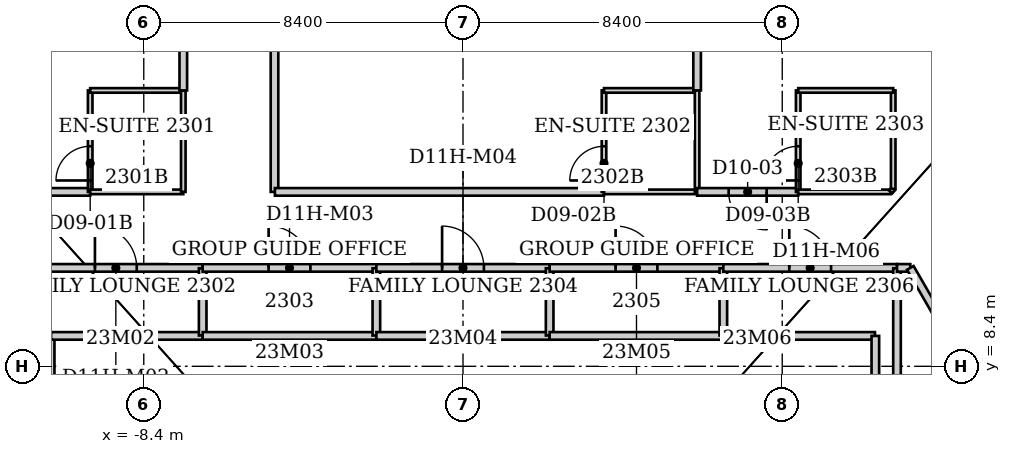
"""IFC4 building model, lengths in metres.
Left out: names, types, materials, properties, quantities, classifications, styles, units other than length and angle.
Written with IfcOpenShell. Run it as: python <this file> out.ifc"""

import sys

from ifc_helpers import new_model, si_unit, direction, frame, frame_2d, origin, place, context, subcontext, project, spatial, rectangle, extrude, element, fill, save


model = new_model("IFC4")
c1 = context("Model", 3, precision=1e-05, world=origin(), true_north=direction((0.0, 1.0)))
c2 = subcontext(c1, "Body", "Model", "MODEL_VIEW")
j1 = project(units=[si_unit("LENGTHUNIT", "METRE"), si_unit("PLANEANGLEUNIT", "RADIAN")], contexts=[c1])
p1 = place(None, origin())
s1 = spatial("IfcSite", under=j1, at=p1, CompositionType="ELEMENT")
p2 = place(p1, origin())
s2 = spatial("IfcBuilding", under=s1, at=p2, CompositionType="ELEMENT")
p3 = place(p2, frame((0.0, 0.0, 96.8)))
s3 = spatial("IfcBuildingStorey", under=s2, at=p3, CompositionType="ELEMENT", Elevation=96.8)
p4 = place(p3, frame((-11.42, 10.99, 0.0), z_axis=(0.0, 0.0, 1.0), x_axis=(1.0, 0.0, 0.0)))
e1 = element("IfcWall", 1, at=p4, inside=s3, PredefinedType="PARTITIONING", context=c2, shape_type="SweptSolid", body=[
    extrude(rectangle(XDim=4.57, YDim=0.2, at=frame_2d((2.285, 0.0))), origin(), (0.0, 0.0, 1.0), 3.64),
])
p5 = place(p4, frame((1.735, 0.0, 0.0)))
e2 = element("IfcOpeningElement", 2, at=p5, cuts=e1, PredefinedType="OPENING", context=c2, shape_type="SweptSolid", body=[
    extrude(rectangle(XDim=1.1, YDim=2.2, at=frame_2d((0.55, 1.1))), frame((0.0, 0.1, 0.0), z_axis=(0.0, -1.0, 0.0), x_axis=(1.0, 0.0, 0.0)), (0.0, 0.0, 1.0), 0.2),
])
p6 = place(p3, frame((-10.85, 9.2, 0.0), z_axis=(0.0, 0.0, 1.0), x_axis=(0.0, -1.0, 0.0)))
e3 = element("IfcWall", 3, at=p6, inside=s3, PredefinedType="PARTITIONING", context=c2, shape_type="SweptSolid", body=[
    extrude(rectangle(XDim=14.39, YDim=0.2, at=frame_2d((7.195, 0.0))), origin(), (0.0, 0.0, 1.0), 3.64),
])
p7 = place(p3, frame((-9.81, 12.99, 0.0), z_axis=(0.0, 0.0, 1.0), x_axis=(-1.0, 0.0, 0.0)))
e4 = element("IfcWall", 4, at=p7, inside=s3, PredefinedType="PARTITIONING", context=c2, shape_type="SweptSolid", body=[
    extrude(rectangle(XDim=1.44, YDim=0.2, at=frame_2d((0.72, 0.0))), origin(), (0.0, 0.0, 1.0), 3.64),
])
p8 = place(p3, frame((-9.81, 15.66, 0.0), z_axis=(0.0, 0.0, 1.0), x_axis=(0.0, -1.0, 0.0)))
e5 = element("IfcWall", 5, at=p8, inside=s3, PredefinedType="PARTITIONING", context=c2, shape_type="SweptSolid", body=[
    extrude(rectangle(XDim=2.67, YDim=0.12, at=frame_2d((1.335, 0.0))), origin(), (0.0, 0.0, 1.0), 3.038),
])
p9 = place(p8, frame((1.47, 0.0, 0.0)))
e6 = element("IfcOpeningElement", 6, at=p9, cuts=e5, PredefinedType="OPENING", context=c2, shape_type="SweptSolid", body=[
    extrude(rectangle(XDim=0.9, YDim=2.03, at=frame_2d((0.45, 1.015))), frame((0.0, 0.06, 0.0), z_axis=(0.0, -1.0, 0.0), x_axis=(1.0, 0.0, 0.0)), (0.0, 0.0, 1.0), 0.12),
])
for number, where, z_axis, x_axis in (
    (7, (-7.36, 12.99, 0.0), (0.0, 0.0, 1.0), (-1.0, 0.0, 0.0)),
    (8, (-7.36, 15.66, 0.0), (0.0, 0.0, 1.0), (-1.0, 0.0, 0.0)),
):
    element("IfcWall", number, at=place(p3, frame(where, z_axis=z_axis, x_axis=x_axis)), inside=s3, PredefinedType="PARTITIONING", context=c2, shape_type="SweptSolid", body=[
        extrude(rectangle(XDim=2.45, YDim=0.12, at=frame_2d((1.225, 0.0))), origin(), (0.0, 0.0, 1.0), 3.64),
    ])
p10 = place(p3, frame((-7.36, 15.66, 0.0), z_axis=(0.0, 0.0, 1.0), x_axis=(0.0, -1.0, 0.0)))
e9 = element("IfcWall", 9, at=p10, inside=s3, PredefinedType="PARTITIONING", context=c2, shape_type="SweptSolid", body=[
    extrude(rectangle(XDim=2.67, YDim=0.12, at=frame_2d((1.335, 0.0))), origin(), (0.0, 0.0, 1.0), 3.64),
])
p11 = place(p3, frame((-7.36, 22.46, 0.0), z_axis=(0.0, 0.0, 1.0), x_axis=(0.0, -1.0, 0.0)))
e10 = element("IfcWall", 10, at=p11, inside=s3, PredefinedType="PARTITIONING", context=c2, shape_type="SweptSolid", body=[
    extrude(rectangle(XDim=6.8, YDim=0.2, at=frame_2d((3.4, 0.0))), origin(), (0.0, 0.0, 1.0), 3.64),
])
p12 = place(p11, frame((2.9, 0.0, 0.0)))
e11 = element("IfcOpeningElement", 11, at=p12, cuts=e10, PredefinedType="OPENING", context=c2, shape_type="SweptSolid", body=[
    extrude(rectangle(XDim=1.0, YDim=2.13, at=frame_2d((0.5, 1.065))), frame((0.0, 0.1, 0.0), z_axis=(0.0, -1.0, 0.0), x_axis=(1.0, 0.0, 0.0)), (0.0, 0.0, 1.0), 0.2),
])
p13 = place(p3, frame((-6.85, 9.2, 0.0), z_axis=(0.0, 0.0, 1.0), x_axis=(-1.0, 0.0, 0.0)))
e12 = element("IfcWall", 12, at=p13, inside=s3, PredefinedType="PARTITIONING", context=c2, shape_type="SweptSolid", body=[
    extrude(rectangle(XDim=3.99, YDim=0.2, at=frame_2d((1.995, 0.0))), origin(), (0.0, 0.0, 1.0), 3.64),
])
p14 = place(p3, frame((-6.85, 10.98, 0.0), z_axis=(0.0, 0.0, 1.0), x_axis=(0.0, -1.0, 0.0)))
e13 = element("IfcWall", 13, at=p14, inside=s3, PredefinedType="PARTITIONING", context=c2, shape_type="SweptSolid", body=[
    extrude(rectangle(XDim=1.77, YDim=0.2, at=frame_2d((0.885, 0.0))), origin(), (0.0, 0.0, 1.0), 3.64),
])
p15 = place(p3, frame((-6.85, 10.99, 0.0), z_axis=(0.0, 0.0, 1.0), x_axis=(1.0, 0.0, 0.0)))
e14 = element("IfcWall", 14, at=p15, inside=s3, PredefinedType="PARTITIONING", context=c2, shape_type="SweptSolid", body=[
    extrude(rectangle(XDim=4.57, YDim=0.2, at=frame_2d((2.285, 0.0))), origin(), (0.0, 0.0, 1.0), 3.64),
])
p16 = place(p15, frame((1.735, 0.0, 0.0)))
e15 = element("IfcOpeningElement", 15, at=p16, cuts=e14, PredefinedType="OPENING", context=c2, shape_type="SweptSolid", body=[
    extrude(rectangle(XDim=1.1, YDim=2.2, at=frame_2d((0.55, 1.1))), frame((0.0, 0.1, 0.0), z_axis=(0.0, -1.0, 0.0), x_axis=(1.0, 0.0, 0.0)), (0.0, 0.0, 1.0), 0.2),
])
p17 = place(p3, frame((-4.96, 12.99, 0.0), z_axis=(0.0, 0.0, 1.0), x_axis=(0.0, 1.0, 0.0)))
e16 = element("IfcWall", 16, at=p17, inside=s3, PredefinedType="PARTITIONING", context=c2, shape_type="SweptSolid", body=[
    extrude(rectangle(XDim=9.47, YDim=0.2, at=frame_2d((4.735, 0.0))), origin(), (0.0, 0.0, 1.0), 3.64),
])
p18 = place(p17, frame((4.235, 0.0, 0.0)))
e17 = element("IfcOpeningElement", 17, at=p18, cuts=e16, PredefinedType="OPENING", context=c2, shape_type="SweptSolid", body=[
    extrude(rectangle(XDim=1.0, YDim=2.13, at=frame_2d((0.5, 1.065))), frame((0.0, 0.1, 0.0), z_axis=(0.0, -1.0, 0.0), x_axis=(1.0, 0.0, 0.0)), (0.0, 0.0, 1.0), 0.2),
])
p19 = place(p3, frame((-2.28, 9.2, 0.0), z_axis=(0.0, 0.0, 1.0), x_axis=(-1.0, 0.0, 0.0)))
e18 = element("IfcWall", 18, at=p19, inside=s3, PredefinedType="PARTITIONING", context=c2, shape_type="SweptSolid", body=[
    extrude(rectangle(XDim=4.57, YDim=0.2, at=frame_2d((2.285, 0.0))), origin(), (0.0, 0.0, 1.0), 3.64),
])
p20 = place(p3, frame((-2.28, 10.98, 0.0), z_axis=(0.0, 0.0, 1.0), x_axis=(0.0, -1.0, 0.0)))
e19 = element("IfcWall", 19, at=p20, inside=s3, PredefinedType="PARTITIONING", context=c2, shape_type="SweptSolid", body=[
    extrude(rectangle(XDim=1.77, YDim=0.2, at=frame_2d((0.885, 0.0))), origin(), (0.0, 0.0, 1.0), 3.64),
])
p21 = place(p3, frame((-2.28, 10.99, 0.0), z_axis=(0.0, 0.0, 1.0), x_axis=(1.0, 0.0, 0.0)))
e20 = element("IfcWall", 20, at=p21, inside=s3, PredefinedType="PARTITIONING", context=c2, shape_type="SweptSolid", body=[
    extrude(rectangle(XDim=4.56, YDim=0.2, at=frame_2d((2.28, 0.0))), origin(), (0.0, 0.0, 1.0), 3.64),
])
p22 = place(p21, frame((1.73, 0.0, 0.0)))
e21 = element("IfcOpeningElement", 21, at=p22, cuts=e20, PredefinedType="OPENING", context=c2, shape_type="SweptSolid", body=[
    extrude(rectangle(XDim=1.1, YDim=2.2, at=frame_2d((0.55, 1.1))), frame((0.0, 0.1, 0.0), z_axis=(0.0, -1.0, 0.0), x_axis=(1.0, 0.0, 0.0)), (0.0, 0.0, 1.0), 0.2),
])
p23 = place(p3, frame((2.28, 9.2, 0.0), z_axis=(0.0, 0.0, 1.0), x_axis=(-1.0, 0.0, 0.0)))
e22 = element("IfcWall", 22, at=p23, inside=s3, PredefinedType="PARTITIONING", context=c2, shape_type="SweptSolid", body=[
    extrude(rectangle(XDim=4.56, YDim=0.2, at=frame_2d((2.28, 0.0))), origin(), (0.0, 0.0, 1.0), 3.64),
])
p24 = place(p3, frame((2.28, 10.98, 0.0), z_axis=(0.0, 0.0, 1.0), x_axis=(0.0, -1.0, 0.0)))
e23 = element("IfcWall", 23, at=p24, inside=s3, PredefinedType="PARTITIONING", context=c2, shape_type="SweptSolid", body=[
    extrude(rectangle(XDim=1.77, YDim=0.2, at=frame_2d((0.885, 0.0))), origin(), (0.0, 0.0, 1.0), 3.64),
])
p25 = place(p3, frame((2.28, 10.99, 0.0), z_axis=(0.0, 0.0, 1.0), x_axis=(1.0, 0.0, 0.0)))
e24 = element("IfcWall", 24, at=p25, inside=s3, PredefinedType="PARTITIONING", context=c2, shape_type="SweptSolid", body=[
    extrude(rectangle(XDim=4.57, YDim=0.2, at=frame_2d((2.285, 0.0))), origin(), (0.0, 0.0, 1.0), 3.64),
])
p26 = place(p25, frame((1.735, 0.0, 0.0)))
e25 = element("IfcOpeningElement", 25, at=p26, cuts=e24, PredefinedType="OPENING", context=c2, shape_type="SweptSolid", body=[
    extrude(rectangle(XDim=1.1, YDim=2.2, at=frame_2d((0.55, 1.1))), frame((0.0, 0.1, 0.0), z_axis=(0.0, -1.0, 0.0), x_axis=(1.0, 0.0, 0.0)), (0.0, 0.0, 1.0), 0.2),
])
p27 = place(p3, frame((3.71, 12.99, 0.0), z_axis=(0.0, 0.0, 1.0), x_axis=(-1.0, 0.0, 0.0)))
e26 = element("IfcWall", 26, at=p27, inside=s3, PredefinedType="PARTITIONING", context=c2, shape_type="SweptSolid", body=[
    extrude(rectangle(XDim=8.66, YDim=0.2, at=frame_2d((4.33, 0.0))), origin(), (0.0, 0.0, 1.0), 3.64),
])
p28 = place(p3, frame((3.71, 15.66, 0.0), z_axis=(0.0, 0.0, 1.0), x_axis=(0.0, -1.0, 0.0)))
e27 = element("IfcWall", 27, at=p28, inside=s3, PredefinedType="PARTITIONING", context=c2, shape_type="SweptSolid", body=[
    extrude(rectangle(XDim=2.67, YDim=0.12, at=frame_2d((1.335, 0.0))), origin(), (0.0, 0.0, 1.0), 3.64),
])
p29 = place(p28, frame((1.47, 0.0, 0.0)))
e28 = element("IfcOpeningElement", 28, at=p29, cuts=e27, PredefinedType="OPENING", context=c2, shape_type="SweptSolid", body=[
    extrude(rectangle(XDim=0.9, YDim=2.03, at=frame_2d((0.45, 1.015))), frame((0.0, 0.06, 0.0), z_axis=(0.0, -1.0, 0.0), x_axis=(1.0, 0.0, 0.0)), (0.0, 0.0, 1.0), 0.12),
])
for number, where, z_axis, x_axis in (
    (29, (6.16, 12.99, 0.0), (0.0, 0.0, 1.0), (-1.0, 0.0, 0.0)),
    (30, (6.16, 15.66, 0.0), (0.0, 0.0, 1.0), (-1.0, 0.0, 0.0)),
):
    element("IfcWall", number, at=place(p3, frame(where, z_axis=z_axis, x_axis=x_axis)), inside=s3, PredefinedType="PARTITIONING", context=c2, shape_type="SweptSolid", body=[
        extrude(rectangle(XDim=2.45, YDim=0.12, at=frame_2d((1.225, 0.0))), origin(), (0.0, 0.0, 1.0), 3.64),
    ])
p30 = place(p3, frame((6.16, 15.66, 0.0), z_axis=(0.0, 0.0, 1.0), x_axis=(0.0, -1.0, 0.0)))
e31 = element("IfcWall", 31, at=p30, inside=s3, PredefinedType="PARTITIONING", context=c2, shape_type="SweptSolid", body=[
    extrude(rectangle(XDim=2.67, YDim=0.12, at=frame_2d((1.335, 0.0))), origin(), (0.0, 0.0, 1.0), 3.64),
])
p31 = place(p3, frame((6.16, 22.37, 0.0), z_axis=(0.0, 0.0, 1.0), x_axis=(0.0, -1.0, 0.0)))
e32 = element("IfcWall", 32, at=p31, inside=s3, PredefinedType="PARTITIONING", context=c2, shape_type="SweptSolid", body=[
    extrude(rectangle(XDim=6.71, YDim=0.2, at=frame_2d((3.355, 0.0))), origin(), (0.0, 0.0, 1.0), 3.64),
])
p32 = place(p3, frame((6.85, 9.2, 0.0), z_axis=(0.0, 0.0, 1.0), x_axis=(-1.0, 0.0, 0.0)))
e33 = element("IfcWall", 33, at=p32, inside=s3, PredefinedType="PARTITIONING", context=c2, shape_type="SweptSolid", body=[
    extrude(rectangle(XDim=4.57, YDim=0.2, at=frame_2d((2.285, 0.0))), origin(), (0.0, 0.0, 1.0), 3.64),
])
p33 = place(p3, frame((6.85, 10.98, 0.0), z_axis=(0.0, 0.0, 1.0), x_axis=(0.0, -1.0, 0.0)))
e34 = element("IfcWall", 34, at=p33, inside=s3, PredefinedType="PARTITIONING", context=c2, shape_type="SweptSolid", body=[
    extrude(rectangle(XDim=1.77, YDim=0.2, at=frame_2d((0.885, 0.0))), origin(), (0.0, 0.0, 1.0), 3.64),
])
p34 = place(p3, frame((6.85, 10.99, 0.0), z_axis=(0.0, 0.0, 1.0), x_axis=(1.0, 0.0, 0.0)))
e35 = element("IfcWall", 35, at=p34, inside=s3, PredefinedType="PARTITIONING", context=c2, shape_type="SweptSolid", body=[
    extrude(rectangle(XDim=4.57, YDim=0.2, at=frame_2d((2.285, 0.0))), origin(), (0.0, 0.0, 1.0), 3.64),
])
p35 = place(p34, frame((1.735, 0.0, 0.0)))
e36 = element("IfcOpeningElement", 36, at=p35, cuts=e35, PredefinedType="OPENING", context=c2, shape_type="SweptSolid", body=[
    extrude(rectangle(XDim=1.1, YDim=2.2, at=frame_2d((0.55, 1.1))), frame((0.0, 0.1, 0.0), z_axis=(0.0, -1.0, 0.0), x_axis=(1.0, 0.0, 0.0)), (0.0, 0.0, 1.0), 0.2),
])
p36 = place(p3, frame((8.82, 12.99, 0.0), z_axis=(0.0, 0.0, 1.0), x_axis=(-1.0, 0.0, 0.0)))
e37 = element("IfcWall", 37, at=p36, inside=s3, PredefinedType="PARTITIONING", context=c2, shape_type="SweptSolid", body=[
    extrude(rectangle(XDim=2.66, YDim=0.2, at=frame_2d((1.33, 0.0))), origin(), (0.0, 0.0, 1.0), 3.64),
])
p37 = place(p36, frame((0.83, 0.0, 0.0)))
e38 = element("IfcOpeningElement", 38, at=p37, cuts=e37, PredefinedType="OPENING", context=c2, shape_type="SweptSolid", body=[
    extrude(rectangle(XDim=1.0, YDim=2.13, at=frame_2d((0.5, 1.065))), frame((0.0, 0.1, 0.0), z_axis=(0.0, -1.0, 0.0), x_axis=(1.0, 0.0, 0.0)), (0.0, 0.0, 1.0), 0.2),
])
p38 = place(p3, frame((8.82, 15.66, 0.0), z_axis=(0.0, 0.0, 1.0), x_axis=(0.0, -1.0, 0.0)))
e39 = element("IfcWall", 39, at=p38, inside=s3, PredefinedType="PARTITIONING", context=c2, shape_type="SweptSolid", body=[
    extrude(rectangle(XDim=2.67, YDim=0.12, at=frame_2d((1.335, 0.0))), origin(), (0.0, 0.0, 1.0), 3.64),
])
p39 = place(p38, frame((1.47, 0.0, 0.0)))
e40 = element("IfcOpeningElement", 40, at=p39, cuts=e39, PredefinedType="OPENING", context=c2, shape_type="SweptSolid", body=[
    extrude(rectangle(XDim=0.9, YDim=2.03, at=frame_2d((0.45, 1.015))), frame((0.0, 0.06, 0.0), z_axis=(0.0, -1.0, 0.0), x_axis=(1.0, 0.0, 0.0)), (0.0, 0.0, 1.0), 0.12),
])
p40 = place(p3, frame((10.84, 9.2, 0.0), z_axis=(0.0, 0.0, 1.0), x_axis=(-1.0, 0.0, 0.0)))
e41 = element("IfcWall", 41, at=p40, inside=s3, PredefinedType="PARTITIONING", context=c2, shape_type="SweptSolid", body=[
    extrude(rectangle(XDim=3.99, YDim=0.2, at=frame_2d((1.995, 0.0))), origin(), (0.0, 0.0, 1.0), 3.64),
])
p41 = place(p3, frame((10.85, -5.19, 0.0), z_axis=(0.0, 0.0, 1.0), x_axis=(0.0, 1.0, 0.0)))
e42 = element("IfcWall", 42, at=p41, inside=s3, PredefinedType="PARTITIONING", context=c2, shape_type="SweptSolid", body=[
    extrude(rectangle(XDim=14.39, YDim=0.2, at=frame_2d((7.195, 0.0))), origin(), (0.0, 0.0, 1.0), 3.64),
])
p42 = place(p3, frame((11.25, 12.99, 0.0), z_axis=(0.0, 0.0, 1.0), x_axis=(-1.0, 0.0, 0.0)))
e43 = element("IfcWall", 43, at=p42, inside=s3, PredefinedType="PARTITIONING", context=c2, shape_type="SweptSolid", body=[
    extrude(rectangle(XDim=2.43, YDim=0.12, at=frame_2d((1.215, 0.0))), origin(), (0.0, 0.0, 1.0), 3.64),
])
p43 = place(p3, frame((11.32, 13.07, 0.0), z_axis=(0.0, 0.0, 1.0), x_axis=(-0.658504607869, -0.752576694707, 0.0)))
e44 = element("IfcWall", 44, at=p43, inside=s3, PredefinedType="PARTITIONING", context=c2, shape_type="SweptSolid", body=[
    extrude(rectangle(XDim=0.106, YDim=0.12, at=frame_2d((0.053, 0.0))), origin(), (0.0, 0.0, 1.0), 3.64),
])
p44 = place(p3, frame((11.32, 13.07, 0.0), z_axis=(0.0, 0.0, 1.0), x_axis=(0.0, 1.0, 0.0)))
e45 = element("IfcWall", 45, at=p44, inside=s3, PredefinedType="PARTITIONING", context=c2, shape_type="SweptSolid", body=[
    extrude(rectangle(XDim=2.59, YDim=0.12, at=frame_2d((1.295, 0.0))), origin(), (0.0, 0.0, 1.0), 3.64),
])
p45 = place(p3, frame((11.32, 15.66, 0.0), z_axis=(0.0, 0.0, 1.0), x_axis=(-1.0, 0.0, 0.0)))
e46 = element("IfcWall", 46, at=p45, inside=s3, PredefinedType="PARTITIONING", context=c2, shape_type="SweptSolid", body=[
    extrude(rectangle(XDim=2.5, YDim=0.12, at=frame_2d((1.25, 0.0))), origin(), (0.0, 0.0, 1.0), 3.64),
])
p46 = place(p3, frame((11.42, 10.98, 0.0), z_axis=(0.0, 0.0, 1.0), x_axis=(0.0, -1.0, 0.0)))
e47 = element("IfcWall", 47, at=p46, inside=s3, PredefinedType="PARTITIONING", context=c2, shape_type="SweptSolid", body=[
    extrude(rectangle(XDim=14.985, YDim=0.2, at=frame_2d((7.492, 0.0))), origin(), (0.0, 0.0, 1.0), 3.64),
])
p47 = place(p3, frame((11.42, 10.99, 0.0), z_axis=(0.0, 0.0, 1.0), x_axis=(1.0, 0.0, 0.0)))
e48 = element("IfcWall", 48, at=p47, inside=s3, PredefinedType="PARTITIONING", context=c2, shape_type="SweptSolid", body=[
    extrude(rectangle(XDim=0.35, YDim=0.2, at=frame_2d((0.175, 0.0))), origin(), (0.0, 0.0, 1.0), 3.64),
])
p48 = place(p3, frame((11.77, 10.99, 0.0), z_axis=(0.0, 0.0, 1.0), x_axis=(0.500093981358, -0.865971136822, 0.0)))
e49 = element("IfcWall", 49, at=p48, inside=s3, PredefinedType="PARTITIONING", context=c2, shape_type="SweptSolid", body=[
    extrude(rectangle(XDim=8.418, YDim=0.2, at=frame_2d((4.209, 0.0))), origin(), (0.0, 0.0, 1.0), 3.64),
])
p49 = place(p9, origin())
e50 = element("IfcDoor", 50, at=p49, inside=s3, OperationType="SINGLE_SWING_RIGHT", PredefinedType="DOOR", context=c2, shape_type="SweptSolid", body=[
    extrude(rectangle(XDim=0.9, YDim=2.03, at=frame_2d((0.45, 1.015))), frame((0.0, 0.025, 0.0), z_axis=(0.0, -1.0, 0.0), x_axis=(1.0, 0.0, 0.0)), (0.0, 0.0, 1.0), 0.05),
])
fill(e6, e50)
p50 = place(p29, origin())
e51 = element("IfcDoor", 51, at=p50, inside=s3, OperationType="SINGLE_SWING_RIGHT", PredefinedType="DOOR", context=c2, shape_type="SweptSolid", body=[
    extrude(rectangle(XDim=0.9, YDim=2.03, at=frame_2d((0.45, 1.015))), frame((0.0, 0.025, 0.0), z_axis=(0.0, -1.0, 0.0), x_axis=(1.0, 0.0, 0.0)), (0.0, 0.0, 1.0), 0.05),
])
fill(e28, e51)
p51 = place(p37, origin())
e52 = element("IfcDoor", 52, at=p51, inside=s3, OperationType="SINGLE_SWING_LEFT", PredefinedType="DOOR", context=c2, shape_type="SweptSolid", body=[
    extrude(rectangle(XDim=1.0, YDim=2.13, at=frame_2d((0.5, 1.065))), frame((0.0, 0.025, 0.0), z_axis=(0.0, -1.0, 0.0), x_axis=(1.0, 0.0, 0.0)), (0.0, 0.0, 1.0), 0.05),
])
fill(e38, e52)
p52 = place(p39, origin())
e53 = element("IfcDoor", 53, at=p52, inside=s3, OperationType="SINGLE_SWING_RIGHT", PredefinedType="DOOR", context=c2, shape_type="SweptSolid", body=[
    extrude(rectangle(XDim=0.9, YDim=2.03, at=frame_2d((0.45, 1.015))), frame((0.0, 0.025, 0.0), z_axis=(0.0, -1.0, 0.0), x_axis=(1.0, 0.0, 0.0)), (0.0, 0.0, 1.0), 0.05),
])
fill(e40, e53)
p53 = place(p5, origin())
e54 = element("IfcDoor", 54, at=p53, inside=s3, OperationType="SINGLE_SWING_LEFT", PredefinedType="DOOR", context=c2, shape_type="SweptSolid", body=[
    extrude(rectangle(XDim=1.1, YDim=2.2, at=frame_2d((0.55, 1.1))), frame((0.0, 0.025, 0.0), z_axis=(0.0, -1.0, 0.0), x_axis=(1.0, 0.0, 0.0)), (0.0, 0.0, 1.0), 0.05),
])
fill(e2, e54)
p54 = place(p16, origin())
e55 = element("IfcDoor", 55, at=p54, inside=s3, OperationType="SINGLE_SWING_LEFT", PredefinedType="DOOR", context=c2, shape_type="SweptSolid", body=[
    extrude(rectangle(XDim=1.1, YDim=2.2, at=frame_2d((0.55, 1.1))), frame((0.0, 0.025, 0.0), z_axis=(0.0, -1.0, 0.0), x_axis=(1.0, 0.0, 0.0)), (0.0, 0.0, 1.0), 0.05),
])
fill(e15, e55)
p55 = place(p22, origin())
e56 = element("IfcDoor", 56, at=p55, inside=s3, OperationType="SINGLE_SWING_LEFT", PredefinedType="DOOR", context=c2, shape_type="SweptSolid", body=[
    extrude(rectangle(XDim=1.1, YDim=2.2, at=frame_2d((0.55, 1.1))), frame((0.0, 0.025, 0.0), z_axis=(0.0, -1.0, 0.0), x_axis=(1.0, 0.0, 0.0)), (0.0, 0.0, 1.0), 0.05),
])
fill(e21, e56)
p56 = place(p26, origin())
e57 = element("IfcDoor", 57, at=p56, inside=s3, OperationType="SINGLE_SWING_LEFT", PredefinedType="DOOR", context=c2, shape_type="SweptSolid", body=[
    extrude(rectangle(XDim=1.1, YDim=2.2, at=frame_2d((0.55, 1.1))), frame((0.0, 0.025, 0.0), z_axis=(0.0, -1.0, 0.0), x_axis=(1.0, 0.0, 0.0)), (0.0, 0.0, 1.0), 0.05),
])
fill(e25, e57)
p57 = place(p35, origin())
e58 = element("IfcDoor", 58, at=p57, inside=s3, OperationType="SINGLE_SWING_LEFT", PredefinedType="DOOR", context=c2, shape_type="SweptSolid", body=[
    extrude(rectangle(XDim=1.1, YDim=2.2, at=frame_2d((0.55, 1.1))), frame((0.0, 0.025, 0.0), z_axis=(0.0, -1.0, 0.0), x_axis=(1.0, 0.0, 0.0)), (0.0, 0.0, 1.0), 0.05),
])
fill(e36, e58)
save(model, sys.argv[1])
